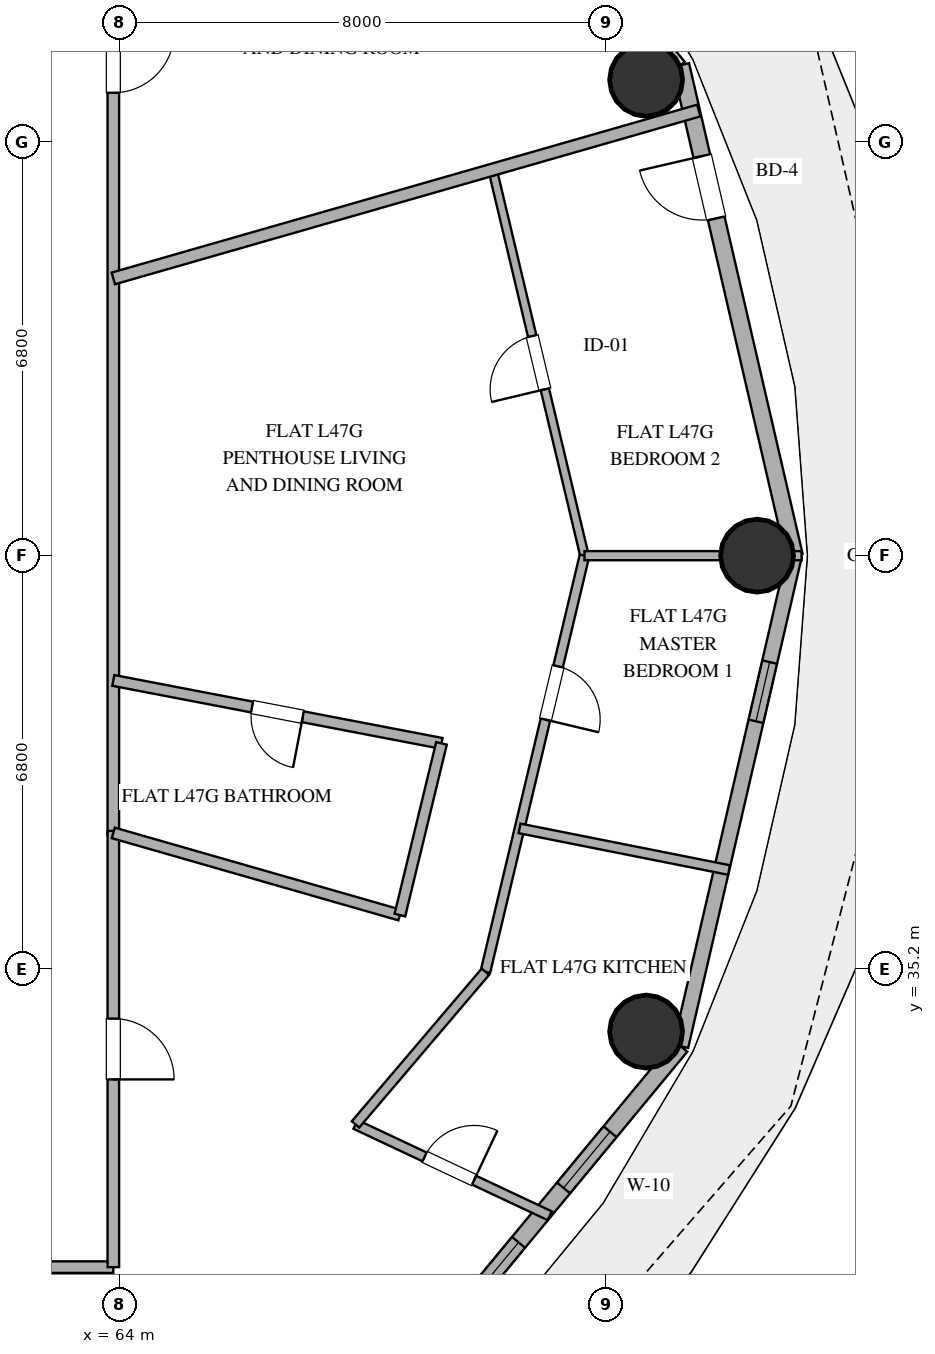
"""IFC4 building model, lengths in metres.
Left out: names, types, materials, properties, quantities, classifications, styles, units other than length and angle.
Written with IfcOpenShell. Run it as: python <this file> out.ifc"""

import sys

from ifc_helpers import new_model, si_unit, direction, frame, frame_2d, origin, origin_2d, place, context, subcontext, project, spatial, rectangle, hollow_circle, extrude, element, fill, save


model = new_model("IFC4")
c1 = context("Model", 3, precision=1e-05, world=origin(), true_north=direction((0.0, 1.0)))
c2 = subcontext(c1, "Body", "Model", "MODEL_VIEW")
j1 = project(units=[si_unit("LENGTHUNIT", "METRE"), si_unit("PLANEANGLEUNIT", "RADIAN")], contexts=[c1])
p1 = place(None, origin())
s1 = spatial("IfcSite", under=j1, at=p1, CompositionType="ELEMENT")
p2 = place(p1, origin())
s2 = spatial("IfcBuilding", under=s1, at=p2, CompositionType="ELEMENT")
p3 = place(p2, frame((0.0, 0.0, 186.6)))
s3 = spatial("IfcBuildingStorey", under=s2, at=p3, CompositionType="ELEMENT", Elevation=186.6)
for number, where, z_axis, x_axis in (
    (1, (74.487, 42.0, 0.0), (0.0, 0.0, 1.0), (1.0, 0.0, 0.0)),
    (2, (72.662, 49.826, 0.0), (0.0, 0.0, 1.0), (1.0, 0.0, 0.0)),
    (3, (72.662, 34.174, 0.0), (0.0, 0.0, 1.0), (1.0, 0.0, 0.0)),
):
    element("IfcColumn", number, at=place(p3, frame(where, z_axis=z_axis, x_axis=x_axis)), inside=s3, PredefinedType="COLUMN", context=c2, shape_type="SweptSolid", body=[
        extrude(hollow_circle(Radius=0.6, WallThickness=0.032, at=origin_2d()), origin(), (0.0, 0.0, 1.0), 3.38),
    ])
p4 = place(p3, frame((75.099, 42.0, 0.0), z_axis=(0.0, 0.0, 1.0), x_axis=(-0.225473184558, 0.974249374157, 0.0)))
e4 = element("IfcWall", 4, at=p4, inside=s3, PredefinedType="SOLIDWALL", context=c2, shape_type="SweptSolid", body=[
    extrude(rectangle(XDim=8.28, YDim=0.28, at=frame_2d((4.14, 0.0))), origin(), (0.0, 0.0, 1.0), 3.38),
])
p5 = place(p4, frame((5.694, 0.0, 0.0)))
e5 = element("IfcOpeningElement", 5, at=p5, cuts=e4, PredefinedType="OPENING", context=c2, shape_type="SweptSolid", body=[
    extrude(rectangle(XDim=1.05, YDim=2.2, at=frame_2d((0.525, 1.1))), frame((0.0, 0.15, 0.0), z_axis=(0.0, -1.0, 0.0), x_axis=(1.0, 0.0, 0.0)), (0.0, 0.0, 1.0), 0.3),
])
p6 = place(p3, frame((67.576, 27.094, 0.0), z_axis=(0.0, 0.0, 1.0), x_axis=(0.637333477683, 0.770588111915, 0.0)))
e6 = element("IfcWall", 6, at=p6, inside=s3, PredefinedType="SOLIDWALL", context=c2, shape_type="SweptSolid", body=[
    extrude(rectangle(XDim=8.875, YDim=0.28, at=frame_2d((4.438, 0.0))), origin(), (0.0, 0.0, 1.0), 3.38),
])
p7 = place(p6, frame((1.875, 0.0, 0.85)))
e7 = element("IfcOpeningElement", 7, at=p7, cuts=e6, PredefinedType="OPENING", context=c2, shape_type="SweptSolid", body=[
    extrude(rectangle(XDim=1.2, YDim=1.8, at=frame_2d((0.6, 0.9))), frame((0.0, 0.15, 0.0), z_axis=(0.0, -1.0, 0.0), x_axis=(1.0, 0.0, 0.0)), (0.0, 0.0, 1.0), 0.3),
])
p8 = place(p6, frame((3.489, 0.0, 0.85)))
e8 = element("IfcOpeningElement", 8, at=p8, cuts=e6, PredefinedType="OPENING", context=c2, shape_type="SweptSolid", body=[
    extrude(rectangle(XDim=1.2, YDim=1.8, at=frame_2d((0.6, 0.9))), frame((0.0, 0.15, 0.0), z_axis=(0.0, -1.0, 0.0), x_axis=(1.0, 0.0, 0.0)), (0.0, 0.0, 1.0), 0.3),
])
p9 = place(p6, frame((5.85, 0.0, 0.85)))
e9 = element("IfcOpeningElement", 9, at=p9, cuts=e6, PredefinedType="OPENING", context=c2, shape_type="SweptSolid", body=[
    extrude(rectangle(XDim=1.2, YDim=1.6, at=frame_2d((0.6, 0.8))), frame((0.0, 0.15, 0.0), z_axis=(0.0, -1.0, 0.0), x_axis=(1.0, 0.0, 0.0)), (0.0, 0.0, 1.0), 0.3),
])
p10 = place(p3, frame((73.232, 33.933, 0.0), z_axis=(0.0, 0.0, 1.0), x_axis=(0.225473184558, 0.974249374157, 0.0)))
e10 = element("IfcWall", 10, at=p10, inside=s3, PredefinedType="SOLIDWALL", context=c2, shape_type="SweptSolid", body=[
    extrude(rectangle(XDim=8.28, YDim=0.25, at=frame_2d((4.14, 0.0))), origin(), (0.0, 0.0, 1.0), 3.38),
])
p11 = place(p10, frame((5.484, 0.0, 1.42)))
e11 = element("IfcOpeningElement", 11, at=p11, cuts=e10, PredefinedType="OPENING", context=c2, shape_type="SweptSolid", body=[
    extrude(rectangle(XDim=1.0, YDim=1.05, at=frame_2d((0.5, 0.525))), frame((0.0, 0.135, 0.0), z_axis=(0.0, -1.0, 0.0), x_axis=(1.0, 0.0, 0.0)), (0.0, 0.0, 1.0), 0.27),
])
p12 = place(p3, frame((46.818, 30.3, 0.0), z_axis=(0.0, 0.0, 1.0), x_axis=(1.0, 0.0, 0.0)))
e12 = element("IfcWall", 12, at=p12, inside=s3, PredefinedType="PARTITIONING", context=c2, shape_type="SweptSolid", body=[
    extrude(rectangle(XDim=17.082, YDim=0.19, at=frame_2d((8.541, 0.0))), origin(), (0.0, 0.0, 1.0), 2.74),
])
p13 = place(p12, frame((5.358, 0.0, 0.0)))
e13 = element("IfcOpeningElement", 13, at=p13, cuts=e12, PredefinedType="OPENING", context=c2, shape_type="SweptSolid", body=[
    extrude(rectangle(XDim=1.0, YDim=2.2, at=frame_2d((0.5, 1.1))), frame((0.0, 0.105, 0.0), z_axis=(0.0, -1.0, 0.0), x_axis=(1.0, 0.0, 0.0)), (0.0, 0.0, 1.0), 0.21),
])
p14 = place(p3, frame((63.9, 53.7, 0.0), z_axis=(0.0, 0.0, 1.0), x_axis=(0.0, -1.0, 0.0)))
e14 = element("IfcWall", 14, at=p14, inside=s3, PredefinedType="PARTITIONING", context=c2, shape_type="SweptSolid", body=[
    extrude(rectangle(XDim=16.292, YDim=0.19, at=frame_2d((8.146, 0.0))), origin(), (0.0, 0.0, 1.0), 2.74),
])
p15 = place(p14, frame((3.087, 0.0, 0.0)))
e15 = element("IfcOpeningElement", 15, at=p15, cuts=e14, PredefinedType="OPENING", context=c2, shape_type="SweptSolid", body=[
    extrude(rectangle(XDim=1.0, YDim=2.2, at=frame_2d((0.5, 1.1))), frame((0.0, 0.105, 0.0), z_axis=(0.0, -1.0, 0.0), x_axis=(1.0, 0.0, 0.0)), (0.0, 0.0, 1.0), 0.21),
])
p16 = place(p3, frame((63.9, 37.474, 0.0), z_axis=(0.0, 0.0, 1.0), x_axis=(0.0, -1.0, 0.0)))
e16 = element("IfcWall", 16, at=p16, inside=s3, PredefinedType="PARTITIONING", context=c2, shape_type="SweptSolid", body=[
    extrude(rectangle(XDim=7.174, YDim=0.19, at=frame_2d((3.587, 0.0))), origin(), (0.0, 0.0, 1.0), 2.74),
])
p17 = place(p16, frame((3.087, 0.0, 0.0)))
e17 = element("IfcOpeningElement", 17, at=p17, cuts=e16, PredefinedType="OPENING", context=c2, shape_type="SweptSolid", body=[
    extrude(rectangle(XDim=1.0, YDim=2.2, at=frame_2d((0.5, 1.1))), frame((0.0, 0.105, 0.0), z_axis=(0.0, -1.0, 0.0), x_axis=(1.0, 0.0, 0.0)), (0.0, 0.0, 1.0), 0.21),
])
p18 = place(p3, frame((71.649, 42.0, 0.0), z_axis=(0.0, 0.0, 1.0), x_axis=(-0.231639074409, 0.972801798522, 0.0)))
e18 = element("IfcWall", 18, at=p18, inside=s3, PredefinedType="PARTITIONING", context=c2, shape_type="SweptSolid", body=[
    extrude(rectangle(XDim=6.525, YDim=0.14, at=frame_2d((3.263, 0.0))), origin(), (0.0, 0.0, 1.0), 2.74),
])
p19 = place(p18, frame((2.812, 0.0, 0.0)))
e19 = element("IfcOpeningElement", 19, at=p19, cuts=e18, PredefinedType="OPENING", context=c2, shape_type="SweptSolid", body=[
    extrude(rectangle(XDim=0.9, YDim=2.1, at=frame_2d((0.45, 1.05))), frame((0.0, 0.08, 0.0), z_axis=(0.0, -1.0, 0.0), x_axis=(1.0, 0.0, 0.0)), (0.0, 0.0, 1.0), 0.16),
])
p20 = place(p3, frame((73.528, 49.32, 0.0), z_axis=(0.0, 0.0, 1.0), x_axis=(-0.961265987417, -0.275622389211, 0.0)))
e20 = element("IfcWall", 20, at=p20, inside=s3, PredefinedType="PARTITIONING", context=c2, shape_type="SweptSolid", body=[
    extrude(rectangle(XDim=10.016, YDim=0.2, at=frame_2d((5.008, 0.0))), origin(), (0.0, 0.0, 1.0), 2.74),
])
p21 = place(p3, frame((69.297, 38.914, 0.0), z_axis=(0.0, 0.0, 1.0), x_axis=(-0.982108019882, 0.188318446478, 0.0)))
e21 = element("IfcWall", 21, at=p21, inside=s3, PredefinedType="PLUMBINGWALL", context=c2, shape_type="SweptSolid", body=[
    extrude(rectangle(XDim=5.496, YDim=0.18, at=frame_2d((2.748, 0.0))), origin(), (0.0, 0.0, 1.0), 2.74),
])
p22 = place(p21, frame((2.323, 0.0, 0.0)))
e22 = element("IfcOpeningElement", 22, at=p22, cuts=e21, PredefinedType="OPENING", context=c2, shape_type="SweptSolid", body=[
    extrude(rectangle(XDim=0.85, YDim=2.1, at=frame_2d((0.425, 1.05))), frame((0.0, 0.1, 0.0), z_axis=(0.0, -1.0, 0.0), x_axis=(1.0, 0.0, 0.0)), (0.0, 0.0, 1.0), 0.2),
])
p23 = place(p3, frame((63.9, 37.441, 0.0), z_axis=(0.0, 0.0, 1.0), x_axis=(0.961266088446, -0.27562203686, 0.0)))
e23 = element("IfcWall", 23, at=p23, inside=s3, PredefinedType="PLUMBINGWALL", context=c2, shape_type="SweptSolid", body=[
    extrude(rectangle(XDim=4.903, YDim=0.18, at=frame_2d((2.451, 0.0))), origin(), (0.0, 0.0, 1.0), 2.74),
])
p24 = place(p3, frame((71.649, 42.0, 0.0), z_axis=(0.0, 0.0, 1.0), x_axis=(-0.231625219966, -0.972805097373, 0.0)))
e24 = element("IfcWall", 24, at=p24, inside=s3, PredefinedType="PLUMBINGWALL", context=c2, shape_type="SweptSolid", body=[
    extrude(rectangle(XDim=7.033, YDim=0.16, at=frame_2d((3.517, 0.0))), origin(), (0.0, 0.0, 1.0), 2.74),
])
p25 = place(p24, frame((1.871, 0.0, 0.0)))
e25 = element("IfcOpeningElement", 25, at=p25, cuts=e24, PredefinedType="OPENING", context=c2, shape_type="SweptSolid", body=[
    extrude(rectangle(XDim=0.9, YDim=2.1, at=frame_2d((0.45, 1.05))), frame((0.0, 0.09, 0.0), z_axis=(0.0, -1.0, 0.0), x_axis=(1.0, 0.0, 0.0)), (0.0, 0.0, 1.0), 0.18),
])
p26 = place(p3, frame((63.445, 24.846, 0.0), z_axis=(0.0, 0.0, 1.0), x_axis=(-0.669111750453, 0.743161802979, 0.0)))
e26 = element("IfcWall", 26, at=p26, inside=s3, PredefinedType="PARTITIONING", context=c2, shape_type="SweptSolid", body=[
    extrude(rectangle(XDim=7.339, YDim=0.2, at=frame_2d((3.669, 0.0))), origin(), (0.0, 0.0, 1.0), 2.74),
])
p27 = place(p3, frame((75.219, 42.0, 0.0), z_axis=(0.0, 0.0, 1.0), x_axis=(-1.0, 0.0, 0.0)))
e27 = element("IfcWall", 27, at=p27, inside=s3, PredefinedType="PARTITIONING", context=c2, shape_type="SweptSolid", body=[
    extrude(rectangle(XDim=3.571, YDim=0.15, at=frame_2d((1.785, 0.0))), origin(), (0.0, 0.0, 1.0), 2.74),
])
p28 = place(p3, frame((67.883, 32.647, 0.0), z_axis=(0.0, 0.0, 1.0), x_axis=(0.904904903403, -0.425613810628, 0.0)))
e28 = element("IfcWall", 28, at=p28, inside=s3, PredefinedType="PLUMBINGWALL", context=c2, shape_type="SweptSolid", body=[
    extrude(rectangle(XDim=3.53, YDim=0.16, at=frame_2d((1.765, 0.0))), origin(), (0.0, 0.0, 1.0), 2.74),
])
p29 = place(p28, frame((1.255, 0.0, 0.0)))
e29 = element("IfcOpeningElement", 29, at=p29, cuts=e28, PredefinedType="OPENING", context=c2, shape_type="SweptSolid", body=[
    extrude(rectangle(XDim=0.9, YDim=2.1, at=frame_2d((0.45, 1.05))), frame((0.0, 0.09, 0.0), z_axis=(0.0, -1.0, 0.0), x_axis=(1.0, 0.0, 0.0)), (0.0, 0.0, 1.0), 0.18),
])
p30 = place(p3, frame((74.026, 36.831, 0.0), z_axis=(0.0, 0.0, 1.0), x_axis=(-0.980839121604, 0.194819448544, 0.0)))
e30 = element("IfcWall", 30, at=p30, inside=s3, PredefinedType="PLUMBINGWALL", context=c2, shape_type="SweptSolid", body=[
    extrude(rectangle(XDim=3.513, YDim=0.16, at=frame_2d((1.756, 0.0))), origin(), (0.0, 0.0, 1.0), 2.74),
])
p31 = place(p3, frame((70.02, 35.158, 0.0), z_axis=(0.0, 0.0, 1.0), x_axis=(-0.648054655451, -0.761593831086, 0.0)))
e31 = element("IfcWall", 31, at=p31, inside=s3, PredefinedType="PLUMBINGWALL", context=c2, shape_type="SweptSolid", body=[
    extrude(rectangle(XDim=3.296, YDim=0.16, at=frame_2d((1.648, 0.0))), origin(), (0.0, 0.0, 1.0), 2.74),
])
p32 = place(p3, frame((68.613, 36.089, 0.0), z_axis=(0.0, 0.0, 1.0), x_axis=(0.235491818528, 0.971876331334, 0.0)))
e32 = element("IfcWall", 32, at=p32, inside=s3, PredefinedType="PLUMBINGWALL", context=c2, shape_type="SweptSolid", body=[
    extrude(rectangle(XDim=2.906, YDim=0.18, at=frame_2d((1.453, 0.0))), origin(), (0.0, 0.0, 1.0), 2.74),
])
p33 = place(p5, origin())
e33 = element("IfcDoor", 33, at=p33, inside=s3, OperationType="SINGLE_SWING_RIGHT", PredefinedType="DOOR", context=c2, shape_type="SweptSolid", body=[
    extrude(rectangle(XDim=1.05, YDim=2.2, at=frame_2d((0.525, 1.1))), frame((0.0, 0.025, 0.0), z_axis=(0.0, -1.0, 0.0), x_axis=(1.0, 0.0, 0.0)), (0.0, 0.0, 1.0), 0.05),
])
fill(e5, e33)
p34 = place(p8, origin())
e34 = element("IfcWindow", 34, at=p34, inside=s3, PartitioningType="SINGLE_PANEL", PredefinedType="WINDOW", context=c2, shape_type="SweptSolid", body=[
    extrude(rectangle(XDim=1.2, YDim=1.8, at=frame_2d((0.6, 0.9))), frame((0.0, 0.03, 0.0), z_axis=(0.0, -1.0, 0.0), x_axis=(1.0, 0.0, 0.0)), (0.0, 0.0, 1.0), 0.06),
])
fill(e8, e34)
p35 = place(p9, origin())
e35 = element("IfcWindow", 35, at=p35, inside=s3, PartitioningType="SINGLE_PANEL", PredefinedType="WINDOW", context=c2, shape_type="SweptSolid", body=[
    extrude(rectangle(XDim=1.2, YDim=1.6, at=frame_2d((0.6, 0.8))), frame((0.0, 0.03, 0.0), z_axis=(0.0, -1.0, 0.0), x_axis=(1.0, 0.0, 0.0)), (0.0, 0.0, 1.0), 0.06),
])
fill(e9, e35)
p36 = place(p11, origin())
e36 = element("IfcWindow", 36, at=p36, inside=s3, PartitioningType="SINGLE_PANEL", PredefinedType="WINDOW", context=c2, shape_type="SweptSolid", body=[
    extrude(rectangle(XDim=1.0, YDim=1.05, at=frame_2d((0.5, 0.525))), frame((0.0, 0.03, 0.0), z_axis=(0.0, -1.0, 0.0), x_axis=(1.0, 0.0, 0.0)), (0.0, 0.0, 1.0), 0.06),
])
fill(e11, e36)
p37 = place(p15, origin())
e37 = element("IfcDoor", 37, at=p37, inside=s3, OperationType="SINGLE_SWING_LEFT", PredefinedType="DOOR", context=c2, shape_type="SweptSolid", body=[
    extrude(rectangle(XDim=1.0, YDim=2.2, at=frame_2d((0.5, 1.1))), frame((0.0, 0.025, 0.0), z_axis=(0.0, -1.0, 0.0), x_axis=(1.0, 0.0, 0.0)), (0.0, 0.0, 1.0), 0.05),
])
fill(e15, e37)
p38 = place(p17, origin())
e38 = element("IfcDoor", 38, at=p38, inside=s3, OperationType="SINGLE_SWING_RIGHT", PredefinedType="DOOR", context=c2, shape_type="SweptSolid", body=[
    extrude(rectangle(XDim=1.0, YDim=2.2, at=frame_2d((0.5, 1.1))), frame((0.0, 0.025, 0.0), z_axis=(0.0, -1.0, 0.0), x_axis=(1.0, 0.0, 0.0)), (0.0, 0.0, 1.0), 0.05),
])
fill(e17, e38)
p39 = place(p19, origin())
e39 = element("IfcDoor", 39, at=p39, inside=s3, OperationType="SINGLE_SWING_LEFT", PredefinedType="DOOR", context=c2, shape_type="SweptSolid", body=[
    extrude(rectangle(XDim=0.9, YDim=2.1, at=frame_2d((0.45, 1.05))), frame((0.0, 0.025, 0.0), z_axis=(0.0, -1.0, 0.0), x_axis=(1.0, 0.0, 0.0)), (0.0, 0.0, 1.0), 0.05),
])
fill(e19, e39)
p40 = place(p22, origin())
e40 = element("IfcDoor", 40, at=p40, inside=s3, OperationType="SINGLE_SWING_LEFT", PredefinedType="DOOR", context=c2, shape_type="SweptSolid", body=[
    extrude(rectangle(XDim=0.85, YDim=2.1, at=frame_2d((0.425, 1.05))), frame((0.0, 0.025, 0.0), z_axis=(0.0, -1.0, 0.0), x_axis=(1.0, 0.0, 0.0)), (0.0, 0.0, 1.0), 0.05),
])
fill(e22, e40)
p41 = place(p25, origin())
e41 = element("IfcDoor", 41, at=p41, inside=s3, OperationType="SINGLE_SWING_RIGHT", PredefinedType="DOOR", context=c2, shape_type="SweptSolid", body=[
    extrude(rectangle(XDim=0.9, YDim=2.1, at=frame_2d((0.45, 1.05))), frame((0.0, 0.025, 0.0), z_axis=(0.0, -1.0, 0.0), x_axis=(1.0, 0.0, 0.0)), (0.0, 0.0, 1.0), 0.05),
])
fill(e25, e41)
p42 = place(p29, origin())
e42 = element("IfcDoor", 42, at=p42, inside=s3, OperationType="SINGLE_SWING_RIGHT", PredefinedType="DOOR", context=c2, shape_type="SweptSolid", body=[
    extrude(rectangle(XDim=0.9, YDim=2.1, at=frame_2d((0.45, 1.05))), frame((0.0, 0.025, 0.0), z_axis=(0.0, -1.0, 0.0), x_axis=(1.0, 0.0, 0.0)), (0.0, 0.0, 1.0), 0.05),
])
fill(e29, e42)
save(model, sys.argv[1])
